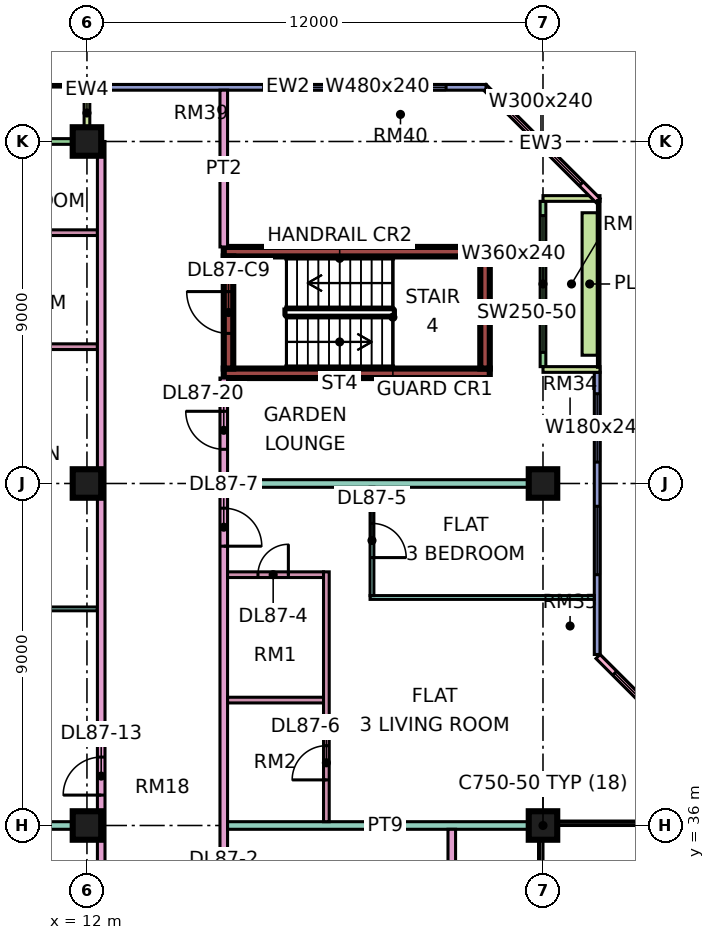
"""IFC4 building model, lengths in metres.
Left out: names, types, materials, properties, quantities, classifications, styles, units other than length and angle.
Written with IfcOpenShell. Run it as: python <this file> out.ifc"""

import sys

from ifc_helpers import new_model, si_unit, direction, frame, frame_2d, origin, origin_2d, place, context, subcontext, project, spatial, rectangle, extrude, element, fill, save


model = new_model("IFC4")
c1 = context("Model", 3, precision=1e-05, world=origin(), true_north=direction((0.0, 1.0)))
c2 = subcontext(c1, "Body", "Model", "MODEL_VIEW")
j1 = project(units=[si_unit("LENGTHUNIT", "METRE"), si_unit("PLANEANGLEUNIT", "RADIAN")], contexts=[c1])
p1 = place(None, origin())
s1 = spatial("IfcSite", under=j1, at=p1, CompositionType="ELEMENT")
p2 = place(p1, origin())
s2 = spatial("IfcBuilding", under=s1, at=p2, CompositionType="ELEMENT")
p3 = place(p2, frame((0.0, 0.0, 372.65)))
s3 = spatial("IfcBuildingStorey", under=s2, at=p3, CompositionType="ELEMENT", Elevation=372.65)
for number, where, z_axis, x_axis in (
    (1, (12.0, 36.0, 0.0), (0.0, 0.0, 1.0), (1.0, 0.0, 0.0)),
    (2, (12.0, 45.0, 0.0), (0.0, 0.0, 1.0), (1.0, 0.0, 0.0)),
    (3, (12.0, 54.0, 0.0), (0.0, 0.0, 1.0), (1.0, 0.0, 0.0)),
    (4, (24.0, 36.0, 0.0), (0.0, 0.0, 1.0), (1.0, 0.0, 0.0)),
    (5, (24.0, 45.0, 0.0), (0.0, 0.0, 1.0), (1.0, 0.0, 0.0)),
):
    element("IfcColumn", number, at=place(p3, frame(where, z_axis=z_axis, x_axis=x_axis)), inside=s3, PredefinedType="COLUMN", context=c2, shape_type="SweptSolid", body=[
        extrude(rectangle(XDim=0.75, YDim=0.75, at=origin_2d()), origin(), (0.0, 0.0, 1.0), 3.75),
    ])
for number, where, z_axis, x_axis in (
    (6, (15.6, 47.9, 0.0), (0.0, 0.0, 1.0), (1.0, 0.0, 0.0)),
    (7, (15.6, 51.1, 0.0), (0.0, 0.0, 1.0), (1.0, 0.0, 0.0)),
):
    element("IfcWall", number, at=place(p3, frame(where, z_axis=z_axis, x_axis=x_axis)), inside=s3, PredefinedType="SHEAR", context=c2, shape_type="SweptSolid", body=[
        extrude(rectangle(XDim=7.0, YDim=0.25, at=frame_2d((3.5, 0.0))), origin(), (0.0, 0.0, 1.0), 3.75),
    ])
p4 = place(p3, frame((15.725, 48.025, 0.0), z_axis=(0.0, 0.0, 1.0), x_axis=(0.0, 1.0, 0.0)))
e8 = element("IfcWall", 8, at=p4, inside=s3, PredefinedType="SHEAR", context=c2, shape_type="SweptSolid", body=[
    extrude(rectangle(XDim=2.95, YDim=0.25, at=frame_2d((1.475, 0.0))), origin(), (0.0, 0.0, 1.0), 3.75),
])
p5 = place(p4, frame((0.925, 0.0, 0.0)))
e9 = element("IfcOpeningElement", 9, at=p5, cuts=e8, PredefinedType="OPENING", context=c2, shape_type="SweptSolid", body=[
    extrude(rectangle(XDim=1.1, YDim=2.2, at=frame_2d((0.55, 1.1))), frame((0.0, 0.135, 0.0), z_axis=(0.0, -1.0, 0.0), x_axis=(1.0, 0.0, 0.0)), (0.0, 0.0, 1.0), 0.27),
])
p6 = place(p3, frame((22.475, 48.025, 0.0), z_axis=(0.0, 0.0, 1.0), x_axis=(0.0, 1.0, 0.0)))
e10 = element("IfcWall", 10, at=p6, inside=s3, PredefinedType="SHEAR", context=c2, shape_type="SweptSolid", body=[
    extrude(rectangle(XDim=2.95, YDim=0.25, at=frame_2d((1.475, 0.0))), origin(), (0.0, 0.0, 1.0), 3.75),
])
p7 = place(p3, frame((28.447, 37.447, 0.0), z_axis=(0.0, 0.0, 1.0), x_axis=(-0.707106781187, 0.707106781187, 0.0)))
e11 = element("IfcWall", 11, at=p7, inside=s3, PredefinedType="SOLIDWALL", context=c2, shape_type="SweptSolid", body=[
    extrude(rectangle(XDim=4.243, YDim=0.15, at=frame_2d((2.121, 0.0))), origin(), (0.0, 0.0, 1.0), 3.35),
])
p8 = place(p7, frame((0.621, 0.0, 0.45)))
e12 = element("IfcOpeningElement", 12, at=p8, cuts=e11, PredefinedType="OPENING", context=c2, shape_type="SweptSolid", body=[
    extrude(rectangle(XDim=3.0, YDim=2.4, at=frame_2d((1.5, 1.2))), frame((0.0, 0.085, 0.0), z_axis=(0.0, -1.0, 0.0), x_axis=(1.0, 0.0, 0.0)), (0.0, 0.0, 1.0), 0.17),
])
p9 = place(p3, frame((25.425, 40.5, 0.0), z_axis=(0.0, 0.0, 1.0), x_axis=(0.0, 1.0, 0.0)))
e13 = element("IfcWall", 13, at=p9, inside=s3, PredefinedType="SOLIDWALL", context=c2, shape_type="SweptSolid", body=[
    extrude(rectangle(XDim=7.425, YDim=0.15, at=frame_2d((3.712, 0.0))), origin(), (0.0, 0.0, 1.0), 3.35),
])
p10 = place(p9, frame((2.1, 0.0, 0.45)))
e14 = element("IfcOpeningElement", 14, at=p10, cuts=e13, PredefinedType="OPENING", context=c2, shape_type="SweptSolid", body=[
    extrude(rectangle(XDim=1.8, YDim=2.4, at=frame_2d((0.9, 1.2))), frame((0.0, 0.085, 0.0), z_axis=(0.0, -1.0, 0.0), x_axis=(1.0, 0.0, 0.0)), (0.0, 0.0, 1.0), 0.17),
])
p11 = place(p9, frame((5.062, 0.0, 0.45)))
e15 = element("IfcOpeningElement", 15, at=p11, cuts=e13, PredefinedType="OPENING", context=c2, shape_type="SweptSolid", body=[
    extrude(rectangle(XDim=1.8, YDim=2.4, at=frame_2d((0.9, 1.2))), frame((0.0, 0.085, 0.0), z_axis=(0.0, -1.0, 0.0), x_axis=(1.0, 0.0, 0.0)), (0.0, 0.0, 1.0), 0.17),
])
p12 = place(p3, frame((24.0, 48.075, 0.0), z_axis=(0.0, 0.0, 1.0), x_axis=(0.0, 1.0, 0.0)))
e16 = element("IfcWall", 16, at=p12, inside=s3, PredefinedType="SOLIDWALL", context=c2, shape_type="SweptSolid", body=[
    extrude(rectangle(XDim=4.35, YDim=0.15, at=frame_2d((2.175, 0.0))), origin(), (0.0, 0.0, 1.0), 3.35),
])
p13 = place(p12, frame((0.375, 0.0, 0.45)))
e17 = element("IfcOpeningElement", 17, at=p13, cuts=e16, PredefinedType="OPENING", context=c2, shape_type="SweptSolid", body=[
    extrude(rectangle(XDim=3.6, YDim=2.4, at=frame_2d((1.8, 1.2))), frame((0.0, 0.085, 0.0), z_axis=(0.0, -1.0, 0.0), x_axis=(1.0, 0.0, 0.0)), (0.0, 0.0, 1.0), 0.17),
])
for number, where, z_axis, x_axis in (
    (18, (25.5, 48.0, 0.0), (0.0, 0.0, 1.0), (-1.0, 0.0, 0.0)),
    (19, (25.5, 52.5, 0.0), (0.0, 0.0, 1.0), (-1.0, 0.0, 0.0)),
):
    element("IfcWall", number, at=place(p3, frame(where, z_axis=z_axis, x_axis=x_axis)), inside=s3, PredefinedType="SOLIDWALL", context=c2, shape_type="SweptSolid", body=[
        extrude(rectangle(XDim=1.5, YDim=0.15, at=frame_2d((0.75, 0.0))), origin(), (0.0, 0.0, 1.0), 3.35),
    ])
p14 = place(p3, frame((25.447, 52.447, 0.0), z_axis=(0.0, 0.0, 1.0), x_axis=(-0.707106781187, 0.707106781187, 0.0)))
e20 = element("IfcWall", 20, at=p14, inside=s3, PredefinedType="SOLIDWALL", context=c2, shape_type="SweptSolid", body=[
    extrude(rectangle(XDim=4.243, YDim=0.15, at=frame_2d((2.121, 0.0))), origin(), (0.0, 0.0, 1.0), 3.35),
])
p15 = place(p14, frame((0.621, 0.0, 0.45)))
e21 = element("IfcOpeningElement", 21, at=p15, cuts=e20, PredefinedType="OPENING", context=c2, shape_type="SweptSolid", body=[
    extrude(rectangle(XDim=3.0, YDim=2.4, at=frame_2d((1.5, 1.2))), frame((0.0, 0.085, 0.0), z_axis=(0.0, -1.0, 0.0), x_axis=(1.0, 0.0, 0.0)), (0.0, 0.0, 1.0), 0.17),
])
p16 = place(p3, frame((22.5, 55.425, 0.0), z_axis=(0.0, 0.0, 1.0), x_axis=(-1.0, 0.0, 0.0)))
e22 = element("IfcWall", 22, at=p16, inside=s3, PredefinedType="SOLIDWALL", context=c2, shape_type="SweptSolid", body=[
    extrude(rectangle(XDim=10.425, YDim=0.15, at=frame_2d((5.212, 0.0))), origin(), (0.0, 0.0, 1.0), 3.35),
])
p17 = place(p16, frame((1.05, 0.0, 0.45)))
e23 = element("IfcOpeningElement", 23, at=p17, cuts=e22, PredefinedType="OPENING", context=c2, shape_type="SweptSolid", body=[
    extrude(rectangle(XDim=4.8, YDim=2.4, at=frame_2d((2.4, 1.2))), frame((0.0, 0.085, 0.0), z_axis=(0.0, -1.0, 0.0), x_axis=(1.0, 0.0, 0.0)), (0.0, 0.0, 1.0), 0.17),
])
p18 = place(p3, frame((11.925, 54.0, 0.0), z_axis=(0.0, 0.0, 1.0), x_axis=(-1.0, 0.0, 0.0)))
e24 = element("IfcWall", 24, at=p18, inside=s3, PredefinedType="SOLIDWALL", context=c2, shape_type="SweptSolid", body=[
    extrude(rectangle(XDim=10.35, YDim=0.15, at=frame_2d((5.175, 0.0))), origin(), (0.0, 0.0, 1.0), 3.35),
])
p19 = place(p18, frame((7.05, 0.0, 0.0)))
e25 = element("IfcOpeningElement", 25, at=p19, cuts=e24, PredefinedType="OPENING", context=c2, shape_type="SweptSolid", body=[
    extrude(rectangle(XDim=1.8, YDim=2.4, at=frame_2d((0.9, 1.2))), frame((0.0, 0.085, 0.0), z_axis=(0.0, -1.0, 0.0), x_axis=(1.0, 0.0, 0.0)), (0.0, 0.0, 1.0), 0.17),
])
p20 = place(p3, frame((12.0, 55.5, 0.0), z_axis=(0.0, 0.0, 1.0), x_axis=(0.0, -1.0, 0.0)))
e26 = element("IfcWall", 26, at=p20, inside=s3, PredefinedType="SOLIDWALL", context=c2, shape_type="SweptSolid", body=[
    extrude(rectangle(XDim=1.5, YDim=0.15, at=frame_2d((0.75, 0.0))), origin(), (0.0, 0.0, 1.0), 3.35),
])
p21 = place(p3, frame((25.229, 48.375, 0.0), z_axis=(0.0, 0.0, 1.0), x_axis=(0.0, 1.0, 0.0)))
e27 = element("IfcWall", 27, at=p21, inside=s3, PredefinedType="SOLIDWALL", context=c2, shape_type="SweptSolid", body=[
    extrude(rectangle(XDim=3.75, YDim=0.4, at=frame_2d((1.875, 0.0))), origin(), (0.0, 0.0, 1.0), 0.7),
])
p22 = place(p3, frame((0.0, 36.0, 0.0), z_axis=(0.0, 0.0, 1.0), x_axis=(1.0, 0.0, 0.0)))
e28 = element("IfcWall", 28, at=p22, inside=s3, PredefinedType="PARTITIONING", context=c2, shape_type="SweptSolid", body=[
    extrude(rectangle(XDim=12.275, YDim=0.2, at=frame_2d((6.137, 0.0))), origin(), (0.0, 0.0, 1.0), 3.35),
])
p23 = place(p3, frame((7.65, 41.7, 0.0), z_axis=(0.0, 0.0, 1.0), x_axis=(1.0, 0.0, 0.0)))
e29 = element("IfcWall", 29, at=p23, inside=s3, PredefinedType="PARTITIONING", context=c2, shape_type="SweptSolid", body=[
    extrude(rectangle(XDim=4.625, YDim=0.1, at=frame_2d((2.312, 0.0))), origin(), (0.0, 0.0, 1.0), 3.35),
])
for number, where, z_axis, x_axis in (
    (30, (7.65, 48.6, 0.0), (0.0, 0.0, 1.0), (1.0, 0.0, 0.0)),
    (31, (7.65, 51.6, 0.0), (0.0, 0.0, 1.0), (1.0, 0.0, 0.0)),
):
    element("IfcWall", number, at=place(p3, frame(where, z_axis=z_axis, x_axis=x_axis)), inside=s3, PredefinedType="PARTITIONING", context=c2, shape_type="SweptSolid", body=[
        extrude(rectangle(XDim=4.625, YDim=0.15, at=frame_2d((2.312, 0.0))), origin(), (0.0, 0.0, 1.0), 3.35),
    ])
p24 = place(p3, frame((12.375, 20.0, 0.0), z_axis=(0.0, 0.0, 1.0), x_axis=(0.0, 1.0, 0.0)))
e32 = element("IfcWall", 32, at=p24, inside=s3, PredefinedType="PARTITIONING", context=c2, shape_type="SweptSolid", body=[
    extrude(rectangle(XDim=34.0, YDim=0.2, at=frame_2d((17.0, 0.0))), origin(), (0.0, 0.0, 1.0), 3.35),
])
p25 = place(p24, frame((16.8, 0.0, 0.0)))
e33 = element("IfcOpeningElement", 33, at=p25, cuts=e32, PredefinedType="OPENING", context=c2, shape_type="SweptSolid", body=[
    extrude(rectangle(XDim=1.0, YDim=2.1, at=frame_2d((0.5, 1.05))), frame((0.0, 0.11, 0.0), z_axis=(0.0, -1.0, 0.0), x_axis=(1.0, 0.0, 0.0)), (0.0, 0.0, 1.0), 0.22),
])
p26 = place(p24, frame((0.6, 0.0, 0.0)))
e34 = element("IfcOpeningElement", 34, at=p26, cuts=e32, PredefinedType="OPENING", context=c2, shape_type="SweptSolid", body=[
    extrude(rectangle(XDim=1.2, YDim=2.1, at=frame_2d((0.6, 1.05))), frame((0.0, 0.11, 0.0), z_axis=(0.0, -1.0, 0.0), x_axis=(1.0, 0.0, 0.0)), (0.0, 0.0, 1.0), 0.22),
])
p27 = place(p24, frame((4.5, 0.0, 0.0)))
e35 = element("IfcOpeningElement", 35, at=p27, cuts=e32, PredefinedType="OPENING", context=c2, shape_type="SweptSolid", body=[
    extrude(rectangle(XDim=1.0, YDim=2.1, at=frame_2d((0.5, 1.05))), frame((0.0, 0.11, 0.0), z_axis=(0.0, -1.0, 0.0), x_axis=(1.0, 0.0, 0.0)), (0.0, 0.0, 1.0), 0.22),
])
p28 = place(p3, frame((15.6, 20.0, 0.0), z_axis=(0.0, 0.0, 1.0), x_axis=(0.0, 1.0, 0.0)))
e36 = element("IfcWall", 36, at=p28, inside=s3, PredefinedType="PARTITIONING", context=c2, shape_type="SweptSolid", body=[
    extrude(rectangle(XDim=27.775, YDim=0.2, at=frame_2d((13.887, 0.0))), origin(), (0.0, 0.0, 1.0), 3.35),
])
p29 = place(p28, frame((7.15, 0.0, 0.0)))
e37 = element("IfcOpeningElement", 37, at=p29, cuts=e36, PredefinedType="OPENING", context=c2, shape_type="SweptSolid", body=[
    extrude(rectangle(XDim=1.6, YDim=2.1, at=frame_2d((0.8, 1.05))), frame((0.0, 0.11, 0.0), z_axis=(0.0, -1.0, 0.0), x_axis=(1.0, 0.0, 0.0)), (0.0, 0.0, 1.0), 0.22),
])
p30 = place(p28, frame((13.5, 0.0, 0.0)))
e38 = element("IfcOpeningElement", 38, at=p30, cuts=e36, PredefinedType="OPENING", context=c2, shape_type="SweptSolid", body=[
    extrude(rectangle(XDim=1.0, YDim=2.1, at=frame_2d((0.5, 1.05))), frame((0.0, 0.11, 0.0), z_axis=(0.0, -1.0, 0.0), x_axis=(1.0, 0.0, 0.0)), (0.0, 0.0, 1.0), 0.22),
])
p31 = place(p28, frame((23.35, 0.0, 0.0)))
e39 = element("IfcOpeningElement", 39, at=p31, cuts=e36, PredefinedType="OPENING", context=c2, shape_type="SweptSolid", body=[
    extrude(rectangle(XDim=1.0, YDim=2.1, at=frame_2d((0.5, 1.05))), frame((0.0, 0.11, 0.0), z_axis=(0.0, -1.0, 0.0), x_axis=(1.0, 0.0, 0.0)), (0.0, 0.0, 1.0), 0.22),
])
p32 = place(p28, frame((1.15, 0.0, 0.0)))
e40 = element("IfcOpeningElement", 40, at=p32, cuts=e36, PredefinedType="OPENING", context=c2, shape_type="SweptSolid", body=[
    extrude(rectangle(XDim=1.8, YDim=2.1, at=frame_2d((0.9, 1.05))), frame((0.0, 0.11, 0.0), z_axis=(0.0, -1.0, 0.0), x_axis=(1.0, 0.0, 0.0)), (0.0, 0.0, 1.0), 0.22),
])
p33 = place(p28, frame((25.9, 0.0, 0.0)))
e41 = element("IfcOpeningElement", 41, at=p33, cuts=e36, PredefinedType="OPENING", context=c2, shape_type="SweptSolid", body=[
    extrude(rectangle(XDim=1.0, YDim=2.1, at=frame_2d((0.5, 1.05))), frame((0.0, 0.11, 0.0), z_axis=(0.0, -1.0, 0.0), x_axis=(1.0, 0.0, 0.0)), (0.0, 0.0, 1.0), 0.22),
])
p34 = place(p3, frame((15.6, 51.225, 0.0), z_axis=(0.0, 0.0, 1.0), x_axis=(0.0, 1.0, 0.0)))
e42 = element("IfcWall", 42, at=p34, inside=s3, PredefinedType="PARTITIONING", context=c2, shape_type="SweptSolid", body=[
    extrude(rectangle(XDim=4.125, YDim=0.2, at=frame_2d((2.062, 0.0))), origin(), (0.0, 0.0, 1.0), 3.35),
])
p35 = place(p3, frame((15.7, 36.0, 0.0), z_axis=(0.0, 0.0, 1.0), x_axis=(1.0, 0.0, 0.0)))
e43 = element("IfcWall", 43, at=p35, inside=s3, PredefinedType="PARTITIONING", context=c2, shape_type="SweptSolid", body=[
    extrude(rectangle(XDim=8.3, YDim=0.2, at=frame_2d((4.15, 0.0))), origin(), (0.0, 0.0, 1.0), 3.35),
])
p36 = place(p3, frame((15.7, 39.3, 0.0), z_axis=(0.0, 0.0, 1.0), x_axis=(1.0, 0.0, 0.0)))
e44 = element("IfcWall", 44, at=p36, inside=s3, PredefinedType="PARTITIONING", context=c2, shape_type="SweptSolid", body=[
    extrude(rectangle(XDim=2.525, YDim=0.15, at=frame_2d((1.263, 0.0))), origin(), (0.0, 0.0, 1.0), 3.35),
])
p37 = place(p3, frame((15.7, 42.6, 0.0), z_axis=(0.0, 0.0, 1.0), x_axis=(1.0, 0.0, 0.0)))
e45 = element("IfcWall", 45, at=p37, inside=s3, PredefinedType="PARTITIONING", context=c2, shape_type="SweptSolid", body=[
    extrude(rectangle(XDim=2.525, YDim=0.15, at=frame_2d((1.263, 0.0))), origin(), (0.0, 0.0, 1.0), 3.35),
])
p38 = place(p37, frame((0.8, 0.0, 0.0)))
e46 = element("IfcOpeningElement", 46, at=p38, cuts=e45, PredefinedType="OPENING", context=c2, shape_type="SweptSolid", body=[
    extrude(rectangle(XDim=0.8, YDim=2.1, at=frame_2d((0.4, 1.05))), frame((0.0, 0.085, 0.0), z_axis=(0.0, -1.0, 0.0), x_axis=(1.0, 0.0, 0.0)), (0.0, 0.0, 1.0), 0.17),
])
p39 = place(p3, frame((15.7, 45.0, 0.0), z_axis=(0.0, 0.0, 1.0), x_axis=(1.0, 0.0, 0.0)))
e47 = element("IfcWall", 47, at=p39, inside=s3, PredefinedType="PARTITIONING", context=c2, shape_type="SweptSolid", body=[
    extrude(rectangle(XDim=8.3, YDim=0.2, at=frame_2d((4.15, 0.0))), origin(), (0.0, 0.0, 1.0), 3.35),
])
p40 = place(p3, frame((18.3, 36.1, 0.0), z_axis=(0.0, 0.0, 1.0), x_axis=(0.0, 1.0, 0.0)))
e48 = element("IfcWall", 48, at=p40, inside=s3, PredefinedType="PARTITIONING", context=c2, shape_type="SweptSolid", body=[
    extrude(rectangle(XDim=6.575, YDim=0.15, at=frame_2d((3.288, 0.0))), origin(), (0.0, 0.0, 1.0), 3.35),
])
p41 = place(p40, frame((1.1, 0.0, 0.0)))
e49 = element("IfcOpeningElement", 49, at=p41, cuts=e48, PredefinedType="OPENING", context=c2, shape_type="SweptSolid", body=[
    extrude(rectangle(XDim=0.9, YDim=2.1, at=frame_2d((0.45, 1.05))), frame((0.0, 0.085, 0.0), z_axis=(0.0, -1.0, 0.0), x_axis=(1.0, 0.0, 0.0)), (0.0, 0.0, 1.0), 0.17),
])
p42 = place(p3, frame((19.45, 42.0, 0.0), z_axis=(0.0, 0.0, 1.0), x_axis=(1.0, 0.0, 0.0)))
e50 = element("IfcWall", 50, at=p42, inside=s3, PredefinedType="PARTITIONING", context=c2, shape_type="SweptSolid", body=[
    extrude(rectangle(XDim=5.9, YDim=0.1, at=frame_2d((2.95, 0.0))), origin(), (0.0, 0.0, 1.0), 3.35),
])
p43 = place(p3, frame((19.5, 42.05, 0.0), z_axis=(0.0, 0.0, 1.0), x_axis=(0.0, 1.0, 0.0)))
e51 = element("IfcWall", 51, at=p43, inside=s3, PredefinedType="PARTITIONING", context=c2, shape_type="SweptSolid", body=[
    extrude(rectangle(XDim=2.85, YDim=0.1, at=frame_2d((1.425, 0.0))), origin(), (0.0, 0.0, 1.0), 3.35),
])
p44 = place(p43, frame((1.0, 0.0, 0.0)))
e52 = element("IfcOpeningElement", 52, at=p44, cuts=e51, PredefinedType="OPENING", context=c2, shape_type="SweptSolid", body=[
    extrude(rectangle(XDim=0.9, YDim=2.1, at=frame_2d((0.45, 1.05))), frame((0.0, 0.06, 0.0), z_axis=(0.0, -1.0, 0.0), x_axis=(1.0, 0.0, 0.0)), (0.0, 0.0, 1.0), 0.12),
])
p45 = place(p3, frame((21.6, 23.9, 0.0), z_axis=(0.0, 0.0, 1.0), x_axis=(0.0, 1.0, 0.0)))
e53 = element("IfcWall", 53, at=p45, inside=s3, PredefinedType="PARTITIONING", context=c2, shape_type="SweptSolid", body=[
    extrude(rectangle(XDim=12.0, YDim=0.2, at=frame_2d((6.0, 0.0))), origin(), (0.0, 0.0, 1.0), 3.35),
])
p46 = place(p8, origin())
e54 = element("IfcWindow", 54, at=p46, inside=s3, PartitioningType="SINGLE_PANEL", PredefinedType="WINDOW", context=c2, shape_type="SweptSolid", body=[
    extrude(rectangle(XDim=3.0, YDim=2.4, at=frame_2d((1.5, 1.2))), frame((0.0, 0.03, 0.0), z_axis=(0.0, -1.0, 0.0), x_axis=(1.0, 0.0, 0.0)), (0.0, 0.0, 1.0), 0.06),
])
fill(e12, e54)
p47 = place(p10, origin())
e55 = element("IfcWindow", 55, at=p47, inside=s3, PartitioningType="SINGLE_PANEL", PredefinedType="WINDOW", context=c2, shape_type="SweptSolid", body=[
    extrude(rectangle(XDim=1.8, YDim=2.4, at=frame_2d((0.9, 1.2))), frame((0.0, 0.03, 0.0), z_axis=(0.0, -1.0, 0.0), x_axis=(1.0, 0.0, 0.0)), (0.0, 0.0, 1.0), 0.06),
])
fill(e14, e55)
p48 = place(p11, origin())
e56 = element("IfcWindow", 56, at=p48, inside=s3, PartitioningType="SINGLE_PANEL", PredefinedType="WINDOW", context=c2, shape_type="SweptSolid", body=[
    extrude(rectangle(XDim=1.8, YDim=2.4, at=frame_2d((0.9, 1.2))), frame((0.0, 0.03, 0.0), z_axis=(0.0, -1.0, 0.0), x_axis=(1.0, 0.0, 0.0)), (0.0, 0.0, 1.0), 0.06),
])
fill(e15, e56)
p49 = place(p13, origin())
e57 = element("IfcWindow", 57, at=p49, inside=s3, PartitioningType="SINGLE_PANEL", PredefinedType="WINDOW", context=c2, shape_type="SweptSolid", body=[
    extrude(rectangle(XDim=3.6, YDim=2.4, at=frame_2d((1.8, 1.2))), frame((0.0, 0.03, 0.0), z_axis=(0.0, -1.0, 0.0), x_axis=(1.0, 0.0, 0.0)), (0.0, 0.0, 1.0), 0.06),
])
fill(e17, e57)
p50 = place(p15, origin())
e58 = element("IfcWindow", 58, at=p50, inside=s3, PartitioningType="SINGLE_PANEL", PredefinedType="WINDOW", context=c2, shape_type="SweptSolid", body=[
    extrude(rectangle(XDim=3.0, YDim=2.4, at=frame_2d((1.5, 1.2))), frame((0.0, 0.03, 0.0), z_axis=(0.0, -1.0, 0.0), x_axis=(1.0, 0.0, 0.0)), (0.0, 0.0, 1.0), 0.06),
])
fill(e21, e58)
p51 = place(p17, origin())
e59 = element("IfcWindow", 59, at=p51, inside=s3, PartitioningType="SINGLE_PANEL", PredefinedType="WINDOW", context=c2, shape_type="SweptSolid", body=[
    extrude(rectangle(XDim=4.8, YDim=2.4, at=frame_2d((2.4, 1.2))), frame((0.0, 0.03, 0.0), z_axis=(0.0, -1.0, 0.0), x_axis=(1.0, 0.0, 0.0)), (0.0, 0.0, 1.0), 0.06),
])
fill(e23, e59)
p52 = place(p5, frame((1.1, 0.0, 0.0), z_axis=(0.0, 0.0, 1.0), x_axis=(-1.0, 0.0, 0.0)))
e60 = element("IfcDoor", 60, at=p52, inside=s3, OperationType="SINGLE_SWING_RIGHT", PredefinedType="DOOR", context=c2, shape_type="SweptSolid", body=[
    extrude(rectangle(XDim=1.1, YDim=2.2, at=frame_2d((0.55, 1.1))), frame((0.0, 0.025, 0.0), z_axis=(0.0, -1.0, 0.0), x_axis=(1.0, 0.0, 0.0)), (0.0, 0.0, 1.0), 0.05),
])
fill(e9, e60)
p53 = place(p38, frame((0.8, 0.0, 0.0), z_axis=(0.0, 0.0, 1.0), x_axis=(-1.0, 0.0, 0.0)))
e61 = element("IfcDoor", 61, at=p53, inside=s3, OperationType="SINGLE_SWING_RIGHT", PredefinedType="DOOR", context=c2, shape_type="SweptSolid", body=[
    extrude(rectangle(XDim=0.8, YDim=2.1, at=frame_2d((0.4, 1.05))), frame((0.0, 0.025, 0.0), z_axis=(0.0, -1.0, 0.0), x_axis=(1.0, 0.0, 0.0)), (0.0, 0.0, 1.0), 0.05),
])
fill(e46, e61)
p54 = place(p44, frame((0.9, 0.0, 0.0), z_axis=(0.0, 0.0, 1.0), x_axis=(-1.0, 0.0, 0.0)))
e62 = element("IfcDoor", 62, at=p54, inside=s3, OperationType="SINGLE_SWING_LEFT", PredefinedType="DOOR", context=c2, shape_type="SweptSolid", body=[
    extrude(rectangle(XDim=0.9, YDim=2.1, at=frame_2d((0.45, 1.05))), frame((0.0, 0.025, 0.0), z_axis=(0.0, -1.0, 0.0), x_axis=(1.0, 0.0, 0.0)), (0.0, 0.0, 1.0), 0.05),
])
fill(e52, e62)
p55 = place(p41, origin())
e63 = element("IfcDoor", 63, at=p55, inside=s3, OperationType="SINGLE_SWING_LEFT", PredefinedType="DOOR", context=c2, shape_type="SweptSolid", body=[
    extrude(rectangle(XDim=0.9, YDim=2.1, at=frame_2d((0.45, 1.05))), frame((0.0, 0.025, 0.0), z_axis=(0.0, -1.0, 0.0), x_axis=(1.0, 0.0, 0.0)), (0.0, 0.0, 1.0), 0.05),
])
fill(e49, e63)
p56 = place(p31, frame((1.0, 0.0, 0.0), z_axis=(0.0, 0.0, 1.0), x_axis=(-1.0, 0.0, 0.0)))
e64 = element("IfcDoor", 64, at=p56, inside=s3, OperationType="SINGLE_SWING_LEFT", PredefinedType="DOOR", context=c2, shape_type="SweptSolid", body=[
    extrude(rectangle(XDim=1.0, YDim=2.1, at=frame_2d((0.5, 1.05))), frame((0.0, 0.025, 0.0), z_axis=(0.0, -1.0, 0.0), x_axis=(1.0, 0.0, 0.0)), (0.0, 0.0, 1.0), 0.05),
])
fill(e39, e64)
p57 = place(p25, origin())
e65 = element("IfcDoor", 65, at=p57, inside=s3, OperationType="SINGLE_SWING_LEFT", PredefinedType="DOOR", context=c2, shape_type="SweptSolid", body=[
    extrude(rectangle(XDim=1.0, YDim=2.1, at=frame_2d((0.5, 1.05))), frame((0.0, 0.025, 0.0), z_axis=(0.0, -1.0, 0.0), x_axis=(1.0, 0.0, 0.0)), (0.0, 0.0, 1.0), 0.05),
])
fill(e33, e65)
p58 = place(p33, frame((1.0, 0.0, 0.0), z_axis=(0.0, 0.0, 1.0), x_axis=(-1.0, 0.0, 0.0)))
e66 = element("IfcDoor", 66, at=p58, inside=s3, OperationType="SINGLE_SWING_RIGHT", PredefinedType="DOOR", context=c2, shape_type="SweptSolid", body=[
    extrude(rectangle(XDim=1.0, YDim=2.1, at=frame_2d((0.5, 1.05))), frame((0.0, 0.025, 0.0), z_axis=(0.0, -1.0, 0.0), x_axis=(1.0, 0.0, 0.0)), (0.0, 0.0, 1.0), 0.05),
])
fill(e41, e66)
save(model, sys.argv[1])
